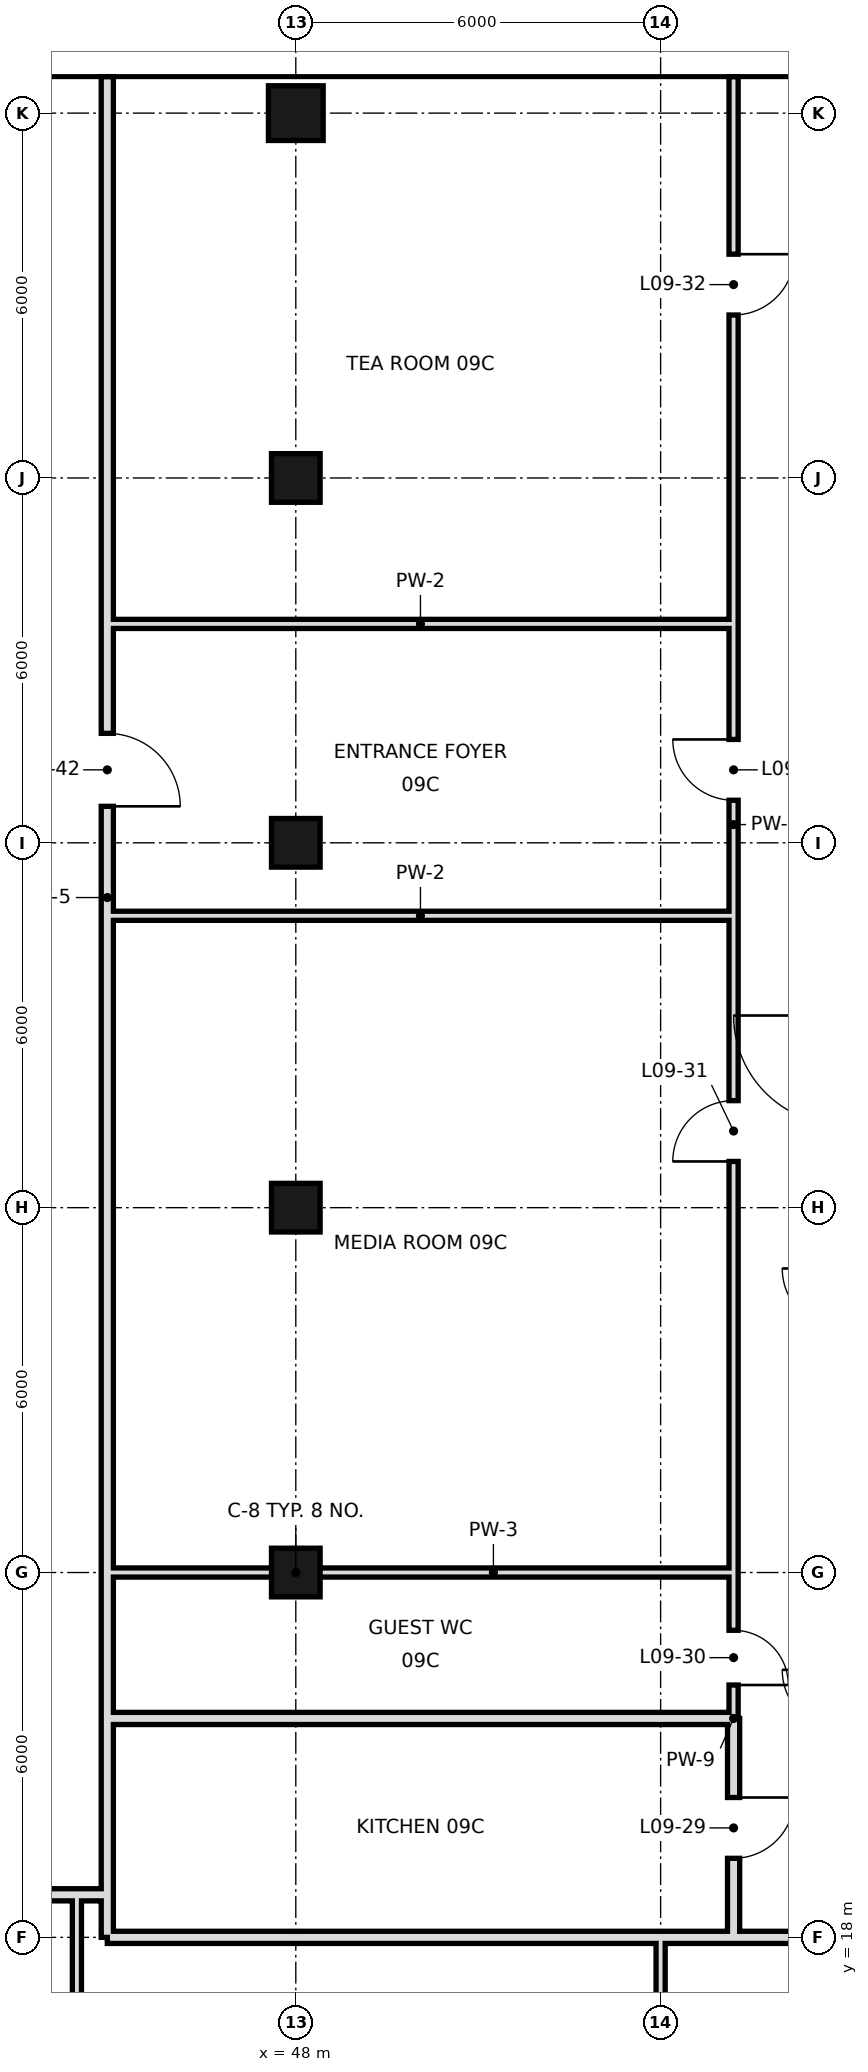
"""IFC4 building model, lengths in metres.
Left out: names, types, materials, properties, quantities, classifications, styles, units other than length and angle.
Written with IfcOpenShell. Run it as: python <this file> out.ifc"""

import sys

from ifc_helpers import new_model, si_unit, direction, frame, frame_2d, origin, origin_2d, place, context, subcontext, project, spatial, rectangle, hollow_rectangle, extrude, element, fill, save


model = new_model("IFC4")
c1 = context("Model", 3, precision=1e-05, world=origin(), true_north=direction((0.0, 1.0)))
c2 = subcontext(c1, "Body", "Model", "MODEL_VIEW")
j1 = project(units=[si_unit("LENGTHUNIT", "METRE"), si_unit("PLANEANGLEUNIT", "RADIAN")], contexts=[c1])
p1 = place(None, origin())
s1 = spatial("IfcSite", under=j1, at=p1, CompositionType="ELEMENT")
p2 = place(p1, origin())
s2 = spatial("IfcBuilding", under=s1, at=p2, CompositionType="ELEMENT")
p3 = place(p2, frame((0.0, 0.0, 53.4)))
s3 = spatial("IfcBuildingStorey", under=s2, at=p3, CompositionType="ELEMENT", Elevation=53.4)
for number, where, z_axis, x_axis in (
    (1, (48.0, 24.0, 0.0), (0.0, 0.0, 1.0), (1.0, 0.0, 0.0)),
    (2, (48.0, 30.0, 0.0), (0.0, 0.0, 1.0), (1.0, 0.0, 0.0)),
    (3, (48.0, 36.0, 0.0), (0.0, 0.0, 1.0), (1.0, 0.0, 0.0)),
    (4, (48.0, 42.0, 0.0), (0.0, 0.0, 1.0), (1.0, 0.0, 0.0)),
):
    element("IfcColumn", number, at=place(p3, frame(where, z_axis=z_axis, x_axis=x_axis)), inside=s3, PredefinedType="COLUMN", context=c2, shape_type="SweptSolid", body=[
        extrude(hollow_rectangle(XDim=0.8, YDim=0.8, WallThickness=0.04, at=origin_2d()), origin(), (0.0, 0.0, 1.0), 3.6),
    ])
p4 = place(p3, frame((48.0, 48.0, 0.0), z_axis=(0.0, 0.0, 1.0), x_axis=(1.0, 0.0, 0.0)))
e5 = element("IfcColumn", 5, at=p4, inside=s3, PredefinedType="COLUMN", context=c2, shape_type="SweptSolid", body=[
    extrude(hollow_rectangle(XDim=0.9, YDim=0.9, WallThickness=0.045, at=origin_2d()), origin(), (0.0, 0.0, 1.0), 3.6),
])
p5 = place(p3, frame((44.4, 10.8, 0.0), z_axis=(0.0, 0.0, 1.0), x_axis=(0.0, 1.0, 0.0)))
e6 = element("IfcWall", 6, at=p5, inside=s3, PredefinedType="PARTITIONING", context=c2, shape_type="SweptSolid", body=[
    extrude(rectangle(XDim=7.9, YDim=0.15, at=frame_2d((3.95, 0.0))), origin(), (0.0, 0.0, 1.0), 3.42),
])
p6 = place(p3, frame((44.9, 21.6, 0.0), z_axis=(0.0, 0.0, 1.0), x_axis=(0.0, 1.0, 0.0)))
e7 = element("IfcWall", 7, at=p6, inside=s3, PredefinedType="SOLIDWALL", context=c2, shape_type="SweptSolid", body=[
    extrude(rectangle(XDim=27.0, YDim=0.2, at=frame_2d((13.5, 0.0))), origin(), (0.0, 0.0, 1.0), 2.72),
])
p7 = place(p6, frame((15.0, 0.0, 0.0)))
e8 = element("IfcOpeningElement", 8, at=p7, cuts=e7, PredefinedType="OPENING", context=c2, shape_type="SweptSolid", body=[
    extrude(rectangle(XDim=1.2, YDim=2.4, at=frame_2d((0.6, 1.2))), frame((0.0, 0.11, 0.0), z_axis=(0.0, -1.0, 0.0), x_axis=(1.0, 0.0, 0.0)), (0.0, 0.0, 1.0), 0.22),
])
p8 = place(p3, frame((44.9, 18.0, 0.0), z_axis=(0.0, 0.0, 1.0), x_axis=(0.0, 1.0, 0.0)))
e9 = element("IfcWall", 9, at=p8, inside=s3, PredefinedType="SOLIDWALL", context=c2, shape_type="SweptSolid", body=[
    extrude(rectangle(XDim=3.6, YDim=0.2, at=frame_2d((1.8, 0.0))), origin(), (0.0, 0.0, 1.0), 2.97),
])
p9 = place(p3, frame((54.0, 10.8, 0.0), z_axis=(0.0, 0.0, 1.0), x_axis=(0.0, 1.0, 0.0)))
e10 = element("IfcWall", 10, at=p9, inside=s3, PredefinedType="PARTITIONING", context=c2, shape_type="SweptSolid", body=[
    extrude(rectangle(XDim=7.2, YDim=0.15, at=frame_2d((3.6, 0.0))), origin(), (0.0, 0.0, 1.0), 3.42),
])
p10 = place(p3, frame((55.2, 18.0, 0.0), z_axis=(0.0, 0.0, 1.0), x_axis=(0.0, 1.0, 0.0)))
e11 = element("IfcWall", 11, at=p10, inside=s3, PredefinedType="SOLIDWALL", context=c2, shape_type="SweptSolid", body=[
    extrude(rectangle(XDim=3.6, YDim=0.2, at=frame_2d((1.8, 0.0))), origin(), (0.0, 0.0, 1.0), 2.52),
])
p11 = place(p10, frame((1.3, 0.0, 0.0)))
e12 = element("IfcOpeningElement", 12, at=p11, cuts=e11, PredefinedType="OPENING", context=c2, shape_type="SweptSolid", body=[
    extrude(rectangle(XDim=1.0, YDim=2.4, at=frame_2d((0.5, 1.2))), frame((0.0, 0.11, 0.0), z_axis=(0.0, -1.0, 0.0), x_axis=(1.0, 0.0, 0.0)), (0.0, 0.0, 1.0), 0.22),
])
p12 = place(p3, frame((55.2, 24.0, 0.0), z_axis=(0.0, 0.0, 1.0), x_axis=(0.0, 1.0, 0.0)))
e13 = element("IfcWall", 13, at=p12, inside=s3, PredefinedType="PARTITIONING", context=c2, shape_type="SweptSolid", body=[
    extrude(rectangle(XDim=24.6, YDim=0.15, at=frame_2d((12.3, 0.0))), origin(), (0.0, 0.0, 1.0), 3.42),
])
p13 = place(p12, frame((12.7, 0.0, 0.0)))
e14 = element("IfcOpeningElement", 14, at=p13, cuts=e13, PredefinedType="OPENING", context=c2, shape_type="SweptSolid", body=[
    extrude(rectangle(XDim=1.0, YDim=2.4, at=frame_2d((0.5, 1.2))), frame((0.0, 0.085, 0.0), z_axis=(0.0, -1.0, 0.0), x_axis=(1.0, 0.0, 0.0)), (0.0, 0.0, 1.0), 0.17),
])
p14 = place(p12, frame((6.76, 0.0, 0.0)))
e15 = element("IfcOpeningElement", 15, at=p14, cuts=e13, PredefinedType="OPENING", context=c2, shape_type="SweptSolid", body=[
    extrude(rectangle(XDim=1.0, YDim=2.4, at=frame_2d((0.5, 1.2))), frame((0.0, 0.085, 0.0), z_axis=(0.0, -1.0, 0.0), x_axis=(1.0, 0.0, 0.0)), (0.0, 0.0, 1.0), 0.17),
])
p15 = place(p12, frame((20.68, 0.0, 0.0)))
e16 = element("IfcOpeningElement", 16, at=p15, cuts=e13, PredefinedType="OPENING", context=c2, shape_type="SweptSolid", body=[
    extrude(rectangle(XDim=1.0, YDim=2.4, at=frame_2d((0.5, 1.2))), frame((0.0, 0.085, 0.0), z_axis=(0.0, -1.0, 0.0), x_axis=(1.0, 0.0, 0.0)), (0.0, 0.0, 1.0), 0.17),
])
p16 = place(p3, frame((55.2, 21.6, 0.0), z_axis=(0.0, 0.0, 1.0), x_axis=(0.0, 1.0, 0.0)))
e17 = element("IfcWall", 17, at=p16, inside=s3, PredefinedType="PARTITIONING", context=c2, shape_type="SweptSolid", body=[
    extrude(rectangle(XDim=2.4, YDim=0.15, at=frame_2d((1.2, 0.0))), origin(), (0.0, 0.0, 1.0), 3.42),
])
p17 = place(p16, frame((0.55, 0.0, 0.0)))
e18 = element("IfcOpeningElement", 18, at=p17, cuts=e17, PredefinedType="OPENING", context=c2, shape_type="SweptSolid", body=[
    extrude(rectangle(XDim=0.9, YDim=2.4, at=frame_2d((0.45, 1.2))), frame((0.0, 0.085, 0.0), z_axis=(0.0, -1.0, 0.0), x_axis=(1.0, 0.0, 0.0)), (0.0, 0.0, 1.0), 0.17),
])
p18 = place(p3, frame((44.9, 18.0, 0.0), z_axis=(0.0, 0.0, 1.0), x_axis=(1.0, 0.0, 0.0)))
e19 = element("IfcWall", 19, at=p18, inside=s3, PredefinedType="SOLIDWALL", context=c2, shape_type="SweptSolid", body=[
    extrude(rectangle(XDim=10.3, YDim=0.2, at=frame_2d((5.15, 0.0))), origin(), (0.0, 0.0, 1.0), 2.52),
])
p19 = place(p3, frame((55.2, 18.0, 0.0), z_axis=(0.0, 0.0, 1.0), x_axis=(1.0, 0.0, 0.0)))
e20 = element("IfcWall", 20, at=p19, inside=s3, PredefinedType="SOLIDWALL", context=c2, shape_type="SweptSolid", body=[
    extrude(rectangle(XDim=5.4, YDim=0.2, at=frame_2d((2.7, 0.0))), origin(), (0.0, 0.0, 1.0), 2.52),
])
p20 = place(p3, frame((6.6, 18.7, 0.0), z_axis=(0.0, 0.0, 1.0), x_axis=(1.0, 0.0, 0.0)))
e21 = element("IfcWall", 21, at=p20, inside=s3, PredefinedType="SOLIDWALL", context=c2, shape_type="SweptSolid", body=[
    extrude(rectangle(XDim=38.3, YDim=0.2, at=frame_2d((19.15, 0.0))), origin(), (0.0, 0.0, 1.0), 2.72),
])
p21 = place(p20, frame((25.8, 0.0, 0.0)))
e22 = element("IfcOpeningElement", 22, at=p21, cuts=e21, PredefinedType="OPENING", context=c2, shape_type="SweptSolid", body=[
    extrude(rectangle(XDim=1.2, YDim=2.4, at=frame_2d((0.6, 1.2))), frame((0.0, 0.11, 0.0), z_axis=(0.0, -1.0, 0.0), x_axis=(1.0, 0.0, 0.0)), (0.0, 0.0, 1.0), 0.22),
])
p22 = place(p20, frame((33.34, 0.0, 0.0)))
e23 = element("IfcOpeningElement", 23, at=p22, cuts=e21, PredefinedType="OPENING", context=c2, shape_type="SweptSolid", body=[
    extrude(rectangle(XDim=1.2, YDim=2.4, at=frame_2d((0.6, 1.2))), frame((0.0, 0.11, 0.0), z_axis=(0.0, -1.0, 0.0), x_axis=(1.0, 0.0, 0.0)), (0.0, 0.0, 1.0), 0.22),
])
p23 = place(p3, frame((44.9, 21.6, 0.0), z_axis=(0.0, 0.0, 1.0), x_axis=(1.0, 0.0, 0.0)))
e24 = element("IfcWall", 24, at=p23, inside=s3, PredefinedType="SOLIDWALL", context=c2, shape_type="SweptSolid", body=[
    extrude(rectangle(XDim=10.3, YDim=0.2, at=frame_2d((5.15, 0.0))), origin(), (0.0, 0.0, 1.0), 2.72),
])
p24 = place(p3, frame((44.9, 24.0, 0.0), z_axis=(0.0, 0.0, 1.0), x_axis=(1.0, 0.0, 0.0)))
e25 = element("IfcWall", 25, at=p24, inside=s3, PredefinedType="PARTITIONING", context=c2, shape_type="SweptSolid", body=[
    extrude(rectangle(XDim=10.3, YDim=0.15, at=frame_2d((5.15, 0.0))), origin(), (0.0, 0.0, 1.0), 2.52),
])
for number, where, z_axis, x_axis in (
    (26, (44.9, 34.8, 0.0), (0.0, 0.0, 1.0), (1.0, 0.0, 0.0)),
    (27, (44.9, 39.6, 0.0), (0.0, 0.0, 1.0), (1.0, 0.0, 0.0)),
):
    element("IfcWall", number, at=place(p3, frame(where, z_axis=z_axis, x_axis=x_axis)), inside=s3, PredefinedType="PARTITIONING", context=c2, shape_type="SweptSolid", body=[
        extrude(rectangle(XDim=10.3, YDim=0.15, at=frame_2d((5.15, 0.0))), origin(), (0.0, 0.0, 1.0), 3.42),
    ])
p25 = place(p13, frame((1.0, 0.0, 0.0), z_axis=(0.0, 0.0, 1.0), x_axis=(-1.0, 0.0, 0.0)))
e28 = element("IfcDoor", 28, at=p25, inside=s3, OperationType="SINGLE_SWING_LEFT", PredefinedType="DOOR", context=c2, shape_type="SweptSolid", body=[
    extrude(rectangle(XDim=1.0, YDim=2.4, at=frame_2d((0.5, 1.2))), frame((0.0, 0.025, 0.0), z_axis=(0.0, -1.0, 0.0), x_axis=(1.0, 0.0, 0.0)), (0.0, 0.0, 1.0), 0.05),
])
fill(e14, e28)
p26 = place(p11, origin())
e29 = element("IfcDoor", 29, at=p26, inside=s3, OperationType="SINGLE_SWING_RIGHT", PredefinedType="DOOR", context=c2, shape_type="SweptSolid", body=[
    extrude(rectangle(XDim=1.0, YDim=2.4, at=frame_2d((0.5, 1.2))), frame((0.0, 0.025, 0.0), z_axis=(0.0, -1.0, 0.0), x_axis=(1.0, 0.0, 0.0)), (0.0, 0.0, 1.0), 0.05),
])
fill(e12, e29)
p27 = place(p17, frame((0.9, 0.0, 0.0), z_axis=(0.0, 0.0, 1.0), x_axis=(-1.0, 0.0, 0.0)))
e30 = element("IfcDoor", 30, at=p27, inside=s3, OperationType="SINGLE_SWING_RIGHT", PredefinedType="DOOR", context=c2, shape_type="SweptSolid", body=[
    extrude(rectangle(XDim=0.9, YDim=2.4, at=frame_2d((0.45, 1.2))), frame((0.0, 0.025, 0.0), z_axis=(0.0, -1.0, 0.0), x_axis=(1.0, 0.0, 0.0)), (0.0, 0.0, 1.0), 0.05),
])
fill(e18, e30)
p28 = place(p14, origin())
e31 = element("IfcDoor", 31, at=p28, inside=s3, OperationType="SINGLE_SWING_LEFT", PredefinedType="DOOR", context=c2, shape_type="SweptSolid", body=[
    extrude(rectangle(XDim=1.0, YDim=2.4, at=frame_2d((0.5, 1.2))), frame((0.0, 0.025, 0.0), z_axis=(0.0, -1.0, 0.0), x_axis=(1.0, 0.0, 0.0)), (0.0, 0.0, 1.0), 0.05),
])
fill(e15, e31)
p29 = place(p15, origin())
e32 = element("IfcDoor", 32, at=p29, inside=s3, OperationType="SINGLE_SWING_RIGHT", PredefinedType="DOOR", context=c2, shape_type="SweptSolid", body=[
    extrude(rectangle(XDim=1.0, YDim=2.4, at=frame_2d((0.5, 1.2))), frame((0.0, 0.025, 0.0), z_axis=(0.0, -1.0, 0.0), x_axis=(1.0, 0.0, 0.0)), (0.0, 0.0, 1.0), 0.05),
])
fill(e16, e32)
p30 = place(p7, frame((1.2, 0.0, 0.0), z_axis=(0.0, 0.0, 1.0), x_axis=(-1.0, 0.0, 0.0)))
e33 = element("IfcDoor", 33, at=p30, inside=s3, OperationType="SINGLE_SWING_RIGHT", PredefinedType="DOOR", context=c2, shape_type="SweptSolid", body=[
    extrude(rectangle(XDim=1.2, YDim=2.4, at=frame_2d((0.6, 1.2))), frame((0.0, 0.025, 0.0), z_axis=(0.0, -1.0, 0.0), x_axis=(1.0, 0.0, 0.0)), (0.0, 0.0, 1.0), 0.05),
])
fill(e8, e33)
save(model, sys.argv[1])
